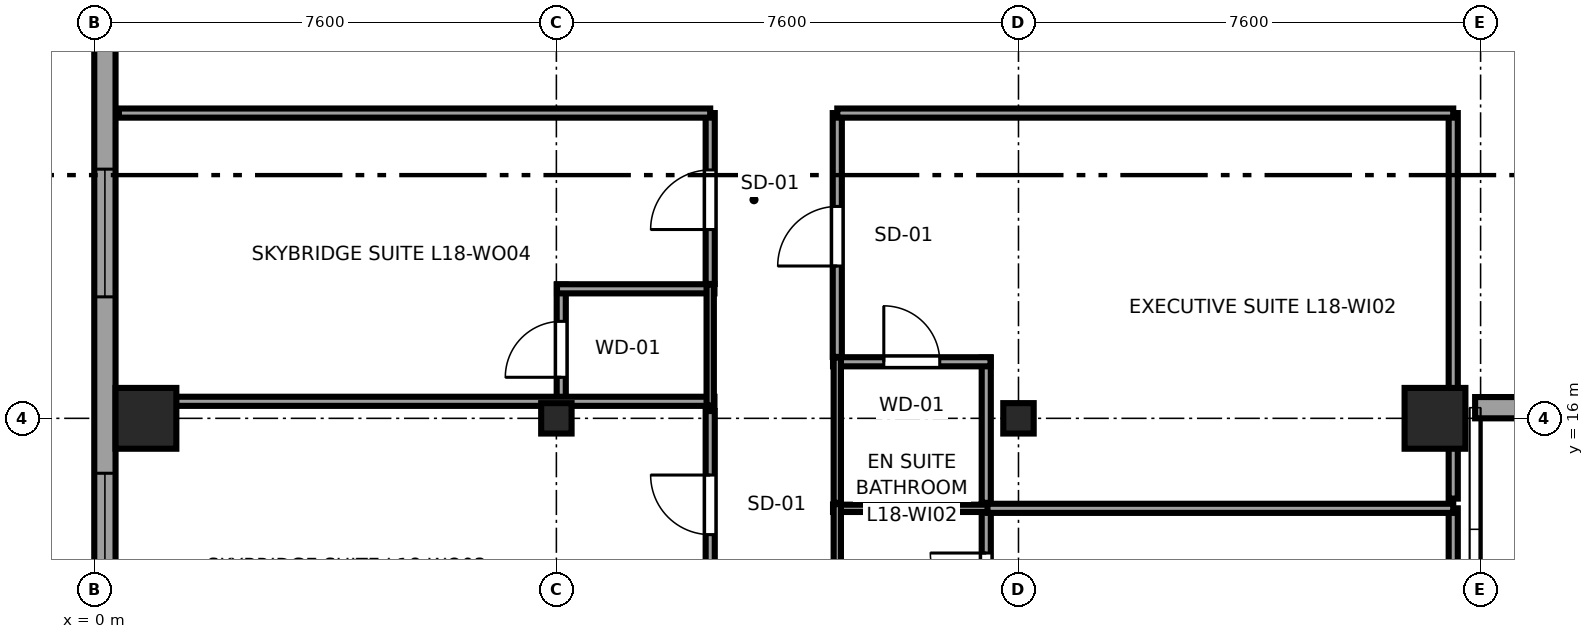
"""IFC4 building model, lengths in metres.
Left out: names, types, materials, properties, quantities, classifications, styles, units other than length and angle.
Written with IfcOpenShell. Run it as: python <this file> out.ifc"""

import sys

from ifc_helpers import new_model, si_unit, direction, frame, frame_2d, origin, origin_2d, place, context, subcontext, project, spatial, rectangle, i_section, extrude, source, transform, mapped, element, fill, save


model = new_model("IFC4")
c1 = context("Model", 3, precision=1e-05, world=origin(), true_north=direction((0.0, 1.0)))
c2 = subcontext(c1, "Body", "Model", "MODEL_VIEW")
j1 = project(units=[si_unit("LENGTHUNIT", "METRE"), si_unit("PLANEANGLEUNIT", "RADIAN")], contexts=[c1])
p1 = place(None, origin())
s1 = spatial("IfcSite", under=j1, at=p1, CompositionType="ELEMENT")
p2 = place(p1, origin())
s2 = spatial("IfcBuilding", under=s1, at=p2, CompositionType="ELEMENT")
p3 = place(p2, frame((0.0, 0.0, 74.6)))
s3 = spatial("IfcBuildingStorey", under=s2, at=p3, CompositionType="ELEMENT", Elevation=74.6)
m1 = source(origin(), c2, "Body", "SweptSolid", [
    extrude(rectangle(XDim=1.0, YDim=1.0, at=origin_2d()), origin(), (0.0, 0.0, 1.0), 3.55),
])
p4 = place(p3, frame((0.85, 16.0, 0.0), z_axis=(0.0, 0.0, 1.0), x_axis=(1.0, 0.0, 0.0)))
e1 = element("IfcColumn", 1, at=p4, inside=s3, PredefinedType="COLUMN", context=c2, shape_type="MappedRepresentation", body=[
    mapped(m1, transform((0.0, 0.0, 0.0), x_axis=(1.0, 0.0, 0.0), y_axis=(0.0, 1.0, 0.0), z_axis=(0.0, 0.0, 1.0), scale=1.0)),
])
m2 = source(origin(), c2, "Body", "SweptSolid", [
    extrude(i_section(OverallWidth=0.5, OverallDepth=0.5, WebThickness=0.028, FlangeThickness=0.045, at=origin_2d()), origin(), (0.0, 0.0, 1.0), 3.55),
])
for number, where, z_axis, x_axis in (
    (2, (7.6, 16.0, 0.0), (0.0, 0.0, 1.0), (1.0, 0.0, 0.0)),
    (3, (15.2, 16.0, 0.0), (0.0, 0.0, 1.0), (1.0, 0.0, 0.0)),
):
    element("IfcColumn", number, at=place(p3, frame(where, z_axis=z_axis, x_axis=x_axis)), inside=s3, PredefinedType="COLUMN", context=c2, shape_type="MappedRepresentation", body=[
        mapped(m2, transform((0.0, 0.0, 0.0), x_axis=(1.0, 0.0, 0.0), y_axis=(0.0, 1.0, 0.0), z_axis=(0.0, 0.0, 1.0), scale=1.0)),
    ])
p5 = place(p3, frame((22.05, 16.0, 0.0), z_axis=(0.0, 0.0, 1.0), x_axis=(1.0, 0.0, 0.0)))
e4 = element("IfcColumn", 4, at=p5, inside=s3, PredefinedType="COLUMN", context=c2, shape_type="MappedRepresentation", body=[
    mapped(m1, transform((0.0, 0.0, 0.0), x_axis=(1.0, 0.0, 0.0), y_axis=(0.0, 1.0, 0.0), z_axis=(0.0, 0.0, 1.0), scale=1.0)),
])
p6 = place(p3, frame((22.71, 16.175, 0.0), z_axis=(0.0, 0.0, 1.0), x_axis=(1.0, 0.0, 0.0)))
e5 = element("IfcWall", 5, at=p6, inside=s3, PredefinedType="SOLIDWALL", context=c2, shape_type="SweptSolid", body=[
    extrude(rectangle(XDim=11.58, YDim=0.35, at=frame_2d((5.79, 0.0))), origin(), (0.0, 0.0, 1.0), 2.748),
])
p7 = place(p6, frame((2.145, 0.0, 0.68)))
e6 = element("IfcOpeningElement", 6, at=p7, cuts=e5, PredefinedType="OPENING", context=c2, shape_type="SweptSolid", body=[
    extrude(rectangle(XDim=2.1, YDim=1.9, at=frame_2d((1.05, 0.95))), frame((0.0, 0.185, 0.0), z_axis=(0.0, -1.0, 0.0), x_axis=(1.0, 0.0, 0.0)), (0.0, 0.0, 1.0), 0.37),
])
p8 = place(p6, frame((7.335, 0.0, 0.68)))
e7 = element("IfcOpeningElement", 7, at=p8, cuts=e5, PredefinedType="OPENING", context=c2, shape_type="SweptSolid", body=[
    extrude(rectangle(XDim=2.1, YDim=1.9, at=frame_2d((1.05, 0.95))), frame((0.0, 0.185, 0.0), z_axis=(0.0, -1.0, 0.0), x_axis=(1.0, 0.0, 0.0)), (0.0, 0.0, 1.0), 0.37),
])
p9 = place(p3, frame((0.175, 41.383, 0.0), z_axis=(0.0, 0.0, 1.0), x_axis=(0.0, -1.0, 0.0)))
e8 = element("IfcWall", 8, at=p9, inside=s3, PredefinedType="SOLIDWALL", context=c2, shape_type="SweptSolid", body=[
    extrude(rectangle(XDim=36.766, YDim=0.35, at=frame_2d((18.383, 0.0))), origin(), (0.0, 0.0, 1.0), 3.37),
])
p10 = place(p9, frame((1.526, 0.0, 0.68)))
e9 = element("IfcOpeningElement", 9, at=p10, cuts=e8, PredefinedType="OPENING", context=c2, shape_type="SweptSolid", body=[
    extrude(rectangle(XDim=2.1, YDim=1.9, at=frame_2d((1.05, 0.95))), frame((0.0, 0.185, 0.0), z_axis=(0.0, -1.0, 0.0), x_axis=(1.0, 0.0, 0.0)), (0.0, 0.0, 1.0), 0.37),
])
p11 = place(p9, frame((4.428, 0.0, 0.68)))
e10 = element("IfcOpeningElement", 10, at=p11, cuts=e8, PredefinedType="OPENING", context=c2, shape_type="SweptSolid", body=[
    extrude(rectangle(XDim=2.1, YDim=1.9, at=frame_2d((1.05, 0.95))), frame((0.0, 0.185, 0.0), z_axis=(0.0, -1.0, 0.0), x_axis=(1.0, 0.0, 0.0)), (0.0, 0.0, 1.0), 0.37),
])
p12 = place(p9, frame((21.285, 0.0, 0.68)))
e11 = element("IfcOpeningElement", 11, at=p12, cuts=e8, PredefinedType="OPENING", context=c2, shape_type="SweptSolid", body=[
    extrude(rectangle(XDim=2.1, YDim=1.9, at=frame_2d((1.05, 0.95))), frame((0.0, 0.185, 0.0), z_axis=(0.0, -1.0, 0.0), x_axis=(1.0, 0.0, 0.0)), (0.0, 0.0, 1.0), 0.37),
])
p13 = place(p9, frame((26.286, 0.0, 0.68)))
e12 = element("IfcOpeningElement", 12, at=p13, cuts=e8, PredefinedType="OPENING", context=c2, shape_type="SweptSolid", body=[
    extrude(rectangle(XDim=2.1, YDim=1.9, at=frame_2d((1.05, 0.95))), frame((0.0, 0.185, 0.0), z_axis=(0.0, -1.0, 0.0), x_axis=(1.0, 0.0, 0.0)), (0.0, 0.0, 1.0), 0.37),
])
p14 = place(p9, frame((30.993, 0.0, 0.62)))
e13 = element("IfcOpeningElement", 13, at=p14, cuts=e8, PredefinedType="OPENING", context=c2, shape_type="SweptSolid", body=[
    extrude(rectangle(XDim=1.5, YDim=1.55, at=frame_2d((0.75, 0.775))), frame((0.0, 0.185, 0.0), z_axis=(0.0, -1.0, 0.0), x_axis=(1.0, 0.0, 0.0)), (0.0, 0.0, 1.0), 0.37),
])
p15 = place(p9, frame((11.733, 0.0, 0.62)))
e14 = element("IfcOpeningElement", 14, at=p15, cuts=e8, PredefinedType="OPENING", context=c2, shape_type="SweptSolid", body=[
    extrude(rectangle(XDim=1.5, YDim=1.55, at=frame_2d((0.75, 0.775))), frame((0.0, 0.185, 0.0), z_axis=(0.0, -1.0, 0.0), x_axis=(1.0, 0.0, 0.0)), (0.0, 0.0, 1.0), 0.37),
])
p16 = place(p3, frame((7.68, 16.21, 0.0), z_axis=(0.0, 0.0, 1.0), x_axis=(0.0, 1.0, 0.0)))
e15 = element("IfcWall", 15, at=p16, inside=s3, PredefinedType="PARTITIONING", context=c2, shape_type="SweptSolid", body=[
    extrude(rectangle(XDim=1.99, YDim=0.15, at=frame_2d((0.995, 0.0))), origin(), (0.0, 0.0, 1.0), 2.827),
])
p17 = place(p16, frame((0.465, 0.0, 0.0)))
e16 = element("IfcOpeningElement", 16, at=p17, cuts=e15, PredefinedType="OPENING", context=c2, shape_type="SweptSolid", body=[
    extrude(rectangle(XDim=0.92, YDim=2.01, at=frame_2d((0.46, 1.005))), frame((0.0, 0.085, 0.0), z_axis=(0.0, -1.0, 0.0), x_axis=(1.0, 0.0, 0.0)), (0.0, 0.0, 1.0), 0.17),
])
p18 = place(p3, frame((0.405, 16.28, 0.0), z_axis=(0.0, 0.0, 1.0), x_axis=(1.0, 0.0, 0.0)))
e17 = element("IfcWall", 17, at=p18, inside=s3, PredefinedType="PARTITIONING", context=c2, shape_type="SweptSolid", body=[
    extrude(rectangle(XDim=9.795, YDim=0.15, at=frame_2d((4.897, 0.0))), origin(), (0.0, 0.0, 1.0), 3.37),
])
p19 = place(p3, frame((7.61, 18.13, 0.0), z_axis=(0.0, 0.0, 1.0), x_axis=(1.0, 0.0, 0.0)))
e18 = element("IfcWall", 18, at=p19, inside=s3, PredefinedType="PARTITIONING", context=c2, shape_type="SweptSolid", body=[
    extrude(rectangle(XDim=2.59, YDim=0.15, at=frame_2d((1.295, 0.0))), origin(), (0.0, 0.0, 1.0), 3.37),
])
p20 = place(p3, frame((10.13, 16.21, 0.0), z_axis=(0.0, 0.0, 1.0), x_axis=(0.0, 1.0, 0.0)))
e19 = element("IfcWall", 19, at=p20, inside=s3, PredefinedType="PLUMBINGWALL", context=c2, shape_type="SweptSolid", body=[
    extrude(rectangle(XDim=1.99, YDim=0.12, at=frame_2d((0.995, 0.0))), origin(), (0.0, 0.0, 1.0), 3.37),
])
p21 = place(p3, frame((14.67, 12.2, 0.0), z_axis=(0.0, 0.0, 1.0), x_axis=(0.0, 1.0, 0.0)))
e20 = element("IfcWall", 20, at=p21, inside=s3, PredefinedType="PARTITIONING", context=c2, shape_type="SweptSolid", body=[
    extrude(rectangle(XDim=2.39, YDim=0.15, at=frame_2d((1.195, 0.0))), origin(), (0.0, 0.0, 1.0), 3.37),
])
p22 = place(p21, frame((0.665, 0.0, 0.0)))
e21 = element("IfcOpeningElement", 21, at=p22, cuts=e20, PredefinedType="OPENING", context=c2, shape_type="SweptSolid", body=[
    extrude(rectangle(XDim=0.92, YDim=2.01, at=frame_2d((0.46, 1.005))), frame((0.0, 0.085, 0.0), z_axis=(0.0, -1.0, 0.0), x_axis=(1.0, 0.0, 0.0)), (0.0, 0.0, 1.0), 0.17),
])
p23 = place(p3, frame((12.15, 14.52, 0.0), z_axis=(0.0, 0.0, 1.0), x_axis=(1.0, 0.0, 0.0)))
e22 = element("IfcWall", 22, at=p23, inside=s3, PredefinedType="PLUMBINGWALL", context=c2, shape_type="SweptSolid", body=[
    extrude(rectangle(XDim=2.59, YDim=0.12, at=frame_2d((1.295, 0.0))), origin(), (0.0, 0.0, 1.0), 3.37),
])
p24 = place(p3, frame((12.22, 12.2, 0.0), z_axis=(0.0, 0.0, 1.0), x_axis=(0.0, 1.0, 0.0)))
e23 = element("IfcWall", 23, at=p24, inside=s3, PredefinedType="PLUMBINGWALL", context=c2, shape_type="SweptSolid", body=[
    extrude(rectangle(XDim=2.39, YDim=0.12, at=frame_2d((1.195, 0.0))), origin(), (0.0, 0.0, 1.0), 3.37),
])
p25 = place(p3, frame((14.67, 14.61, 0.0), z_axis=(0.0, 0.0, 1.0), x_axis=(0.0, 1.0, 0.0)))
e24 = element("IfcWall", 24, at=p25, inside=s3, PredefinedType="PARTITIONING", context=c2, shape_type="SweptSolid", body=[
    extrude(rectangle(XDim=2.39, YDim=0.15, at=frame_2d((1.195, 0.0))), origin(), (0.0, 0.0, 1.0), 3.37),
])
p26 = place(p3, frame((12.15, 16.93, 0.0), z_axis=(0.0, 0.0, 1.0), x_axis=(1.0, 0.0, 0.0)))
e25 = element("IfcWall", 25, at=p26, inside=s3, PredefinedType="PARTITIONING", context=c2, shape_type="SweptSolid", body=[
    extrude(rectangle(XDim=2.59, YDim=0.15, at=frame_2d((1.295, 0.0))), origin(), (0.0, 0.0, 1.0), 3.37),
])
p27 = place(p26, frame((0.835, 0.0, 0.0)))
e26 = element("IfcOpeningElement", 26, at=p27, cuts=e25, PredefinedType="OPENING", context=c2, shape_type="SweptSolid", body=[
    extrude(rectangle(XDim=0.92, YDim=2.01, at=frame_2d((0.46, 1.005))), frame((0.0, 0.085, 0.0), z_axis=(0.0, -1.0, 0.0), x_axis=(1.0, 0.0, 0.0)), (0.0, 0.0, 1.0), 0.17),
])
p28 = place(p3, frame((12.22, 14.61, 0.0), z_axis=(0.0, 0.0, 1.0), x_axis=(0.0, 1.0, 0.0)))
e27 = element("IfcWall", 27, at=p28, inside=s3, PredefinedType="PLUMBINGWALL", context=c2, shape_type="SweptSolid", body=[
    extrude(rectangle(XDim=2.39, YDim=0.12, at=frame_2d((1.195, 0.0))), origin(), (0.0, 0.0, 1.0), 3.37),
])
p29 = place(p3, frame((10.13, 13.075, 0.0), z_axis=(0.0, 0.0, 1.0), x_axis=(0.0, 1.0, 0.0)))
e28 = element("IfcWall", 28, at=p29, inside=s3, PredefinedType="PARTITIONING", context=c2, shape_type="SweptSolid", body=[
    extrude(rectangle(XDim=3.045, YDim=0.15, at=frame_2d((1.522, 0.0))), origin(), (0.0, 0.0, 1.0), 3.37),
])
p30 = place(p29, frame((1.012, 0.0, 0.0)))
e29 = element("IfcOpeningElement", 29, at=p30, cuts=e28, PredefinedType="OPENING", context=c2, shape_type="SweptSolid", body=[
    extrude(rectangle(XDim=0.98, YDim=2.12, at=frame_2d((0.49, 1.06))), frame((0.0, 0.085, 0.0), z_axis=(0.0, -1.0, 0.0), x_axis=(1.0, 0.0, 0.0)), (0.0, 0.0, 1.0), 0.17),
])
p31 = place(p3, frame((10.13, 18.21, 0.0), z_axis=(0.0, 0.0, 1.0), x_axis=(0.0, 1.0, 0.0)))
e30 = element("IfcWall", 30, at=p31, inside=s3, PredefinedType="PARTITIONING", context=c2, shape_type="SweptSolid", body=[
    extrude(rectangle(XDim=2.81, YDim=0.15, at=frame_2d((1.405, 0.0))), origin(), (0.0, 0.0, 1.0), 3.37),
])
p32 = place(p31, frame((0.895, 0.0, 0.0)))
e31 = element("IfcOpeningElement", 31, at=p32, cuts=e30, PredefinedType="OPENING", context=c2, shape_type="SweptSolid", body=[
    extrude(rectangle(XDim=0.98, YDim=2.12, at=frame_2d((0.49, 1.06))), frame((0.0, 0.085, 0.0), z_axis=(0.0, -1.0, 0.0), x_axis=(1.0, 0.0, 0.0)), (0.0, 0.0, 1.0), 0.17),
])
p33 = place(p3, frame((0.405, 21.02, 0.0), z_axis=(0.0, 0.0, 1.0), x_axis=(1.0, 0.0, 0.0)))
e32 = element("IfcWall", 32, at=p33, inside=s3, PredefinedType="PARTITIONING", context=c2, shape_type="SweptSolid", body=[
    extrude(rectangle(XDim=9.725, YDim=0.15, at=frame_2d((4.862, 0.0))), origin(), (0.0, 0.0, 1.0), 3.37),
])
p34 = place(p3, frame((22.35, 8.28, 0.0), z_axis=(0.0, 0.0, 1.0), x_axis=(0.0, 1.0, 0.0)))
e33 = element("IfcWall", 33, at=p34, inside=s3, PredefinedType="PARTITIONING", context=c2, shape_type="SweptSolid", body=[
    extrude(rectangle(XDim=6.24, YDim=0.15, at=frame_2d((3.12, 0.0))), origin(), (0.0, 0.0, 1.0), 3.37),
])
p35 = place(p3, frame((14.69, 14.52, 0.0), z_axis=(0.0, 0.0, 1.0), x_axis=(1.0, 0.0, 0.0)))
e34 = element("IfcWall", 34, at=p35, inside=s3, PredefinedType="PARTITIONING", context=c2, shape_type="SweptSolid", body=[
    extrude(rectangle(XDim=7.66, YDim=0.15, at=frame_2d((3.83, 0.0))), origin(), (0.0, 0.0, 1.0), 3.37),
])
p36 = place(p3, frame((12.22, 17.01, 0.0), z_axis=(0.0, 0.0, 1.0), x_axis=(0.0, 1.0, 0.0)))
e35 = element("IfcWall", 35, at=p36, inside=s3, PredefinedType="PARTITIONING", context=c2, shape_type="SweptSolid", body=[
    extrude(rectangle(XDim=4.01, YDim=0.15, at=frame_2d((2.005, 0.0))), origin(), (0.0, 0.0, 1.0), 3.37),
])
p37 = place(p36, frame((1.495, 0.0, 0.0)))
e36 = element("IfcOpeningElement", 36, at=p37, cuts=e35, PredefinedType="OPENING", context=c2, shape_type="SweptSolid", body=[
    extrude(rectangle(XDim=0.98, YDim=2.12, at=frame_2d((0.49, 1.06))), frame((0.0, 0.085, 0.0), z_axis=(0.0, -1.0, 0.0), x_axis=(1.0, 0.0, 0.0)), (0.0, 0.0, 1.0), 0.17),
])
p38 = place(p3, frame((22.35, 14.68, 0.0), z_axis=(0.0, 0.0, 1.0), x_axis=(0.0, 1.0, 0.0)))
e37 = element("IfcWall", 37, at=p38, inside=s3, PredefinedType="PARTITIONING", context=c2, shape_type="SweptSolid", body=[
    extrude(rectangle(XDim=6.34, YDim=0.15, at=frame_2d((3.17, 0.0))), origin(), (0.0, 0.0, 1.0), 3.37),
])
p39 = place(p3, frame((12.22, 21.02, 0.0), z_axis=(0.0, 0.0, 1.0), x_axis=(1.0, 0.0, 0.0)))
e38 = element("IfcWall", 38, at=p39, inside=s3, PredefinedType="PARTITIONING", context=c2, shape_type="SweptSolid", body=[
    extrude(rectangle(XDim=10.13, YDim=0.15, at=frame_2d((5.065, 0.0))), origin(), (0.0, 0.0, 1.0), 3.37),
])
m3 = source(origin(), c2, "Body", "SweptSolid", [
    extrude(rectangle(XDim=2.1, YDim=1.9, at=frame_2d((1.05, 0.95))), frame((0.0, 0.09, 0.0), z_axis=(0.0, -1.0, 0.0), x_axis=(1.0, 0.0, 0.0)), (0.0, 0.0, 1.0), 0.06),
])
p40 = place(p12, origin())
e39 = element("IfcWindow", 39, at=p40, inside=s3, PartitioningType="TRIPLE_PANEL_HORIZONTAL", PredefinedType="WINDOW", context=c2, shape_type="MappedRepresentation", body=[
    mapped(m3, transform((0.0, 0.0, 0.0), x_axis=(1.0, 0.0, 0.0), y_axis=(0.0, 1.0, 0.0), z_axis=(0.0, 0.0, 1.0), scale=1.0)),
])
fill(e11, e39)
p41 = place(p13, origin())
e40 = element("IfcWindow", 40, at=p41, inside=s3, PartitioningType="TRIPLE_PANEL_HORIZONTAL", PredefinedType="WINDOW", context=c2, shape_type="MappedRepresentation", body=[
    mapped(m3, transform((0.0, 0.0, 0.0), x_axis=(1.0, 0.0, 0.0), y_axis=(0.0, 1.0, 0.0), z_axis=(0.0, 0.0, 1.0), scale=1.0)),
])
fill(e12, e40)
m4 = source(origin(), c2, "Body", "SweptSolid", [
    extrude(rectangle(XDim=0.92, YDim=2.01, at=frame_2d((0.46, 1.005))), frame((0.0, 0.025, 0.0), z_axis=(0.0, -1.0, 0.0), x_axis=(1.0, 0.0, 0.0)), (0.0, 0.0, 1.0), 0.05),
])
p42 = place(p17, origin())
e41 = element("IfcDoor", 41, at=p42, inside=s3, OperationType="SINGLE_SWING_LEFT", PredefinedType="DOOR", context=c2, shape_type="MappedRepresentation", body=[
    mapped(m4, transform((0.0, 0.0, 0.0), x_axis=(1.0, 0.0, 0.0), y_axis=(0.0, 1.0, 0.0), z_axis=(0.0, 0.0, 1.0), scale=1.0)),
])
fill(e16, e41)
p43 = place(p22, origin())
e42 = element("IfcDoor", 42, at=p43, inside=s3, OperationType="SINGLE_SWING_RIGHT", PredefinedType="DOOR", context=c2, shape_type="MappedRepresentation", body=[
    mapped(m4, transform((0.0, 0.0, 0.0), x_axis=(1.0, 0.0, 0.0), y_axis=(0.0, 1.0, 0.0), z_axis=(0.0, 0.0, 1.0), scale=1.0)),
])
fill(e21, e42)
p44 = place(p27, origin())
e43 = element("IfcDoor", 43, at=p44, inside=s3, OperationType="SINGLE_SWING_LEFT", PredefinedType="DOOR", context=c2, shape_type="MappedRepresentation", body=[
    mapped(m4, transform((0.0, 0.0, 0.0), x_axis=(1.0, 0.0, 0.0), y_axis=(0.0, 1.0, 0.0), z_axis=(0.0, 0.0, 1.0), scale=1.0)),
])
fill(e26, e43)
m5 = source(origin(), c2, "Body", "SweptSolid", [
    extrude(rectangle(XDim=0.98, YDim=2.12, at=frame_2d((0.49, 1.06))), frame((0.0, 0.025, 0.0), z_axis=(0.0, -1.0, 0.0), x_axis=(1.0, 0.0, 0.0)), (0.0, 0.0, 1.0), 0.05),
])
p45 = place(p30, origin())
e44 = element("IfcDoor", 44, at=p45, inside=s3, OperationType="SINGLE_SWING_RIGHT", PredefinedType="DOOR", context=c2, shape_type="MappedRepresentation", body=[
    mapped(m5, transform((0.0, 0.0, 0.0), x_axis=(1.0, 0.0, 0.0), y_axis=(0.0, 1.0, 0.0), z_axis=(0.0, 0.0, 1.0), scale=1.0)),
])
fill(e29, e44)
p46 = place(p32, origin())
e45 = element("IfcDoor", 45, at=p46, inside=s3, OperationType="SINGLE_SWING_LEFT", PredefinedType="DOOR", context=c2, shape_type="MappedRepresentation", body=[
    mapped(m5, transform((0.0, 0.0, 0.0), x_axis=(1.0, 0.0, 0.0), y_axis=(0.0, 1.0, 0.0), z_axis=(0.0, 0.0, 1.0), scale=1.0)),
])
fill(e31, e45)
p47 = place(p37, origin())
e46 = element("IfcDoor", 46, at=p47, inside=s3, OperationType="SINGLE_SWING_LEFT", PredefinedType="DOOR", context=c2, shape_type="MappedRepresentation", body=[
    mapped(m5, transform((0.0, 0.0, 0.0), x_axis=(1.0, 0.0, 0.0), y_axis=(0.0, 1.0, 0.0), z_axis=(0.0, 0.0, 1.0), scale=1.0)),
])
fill(e36, e46)
save(model, sys.argv[1])
